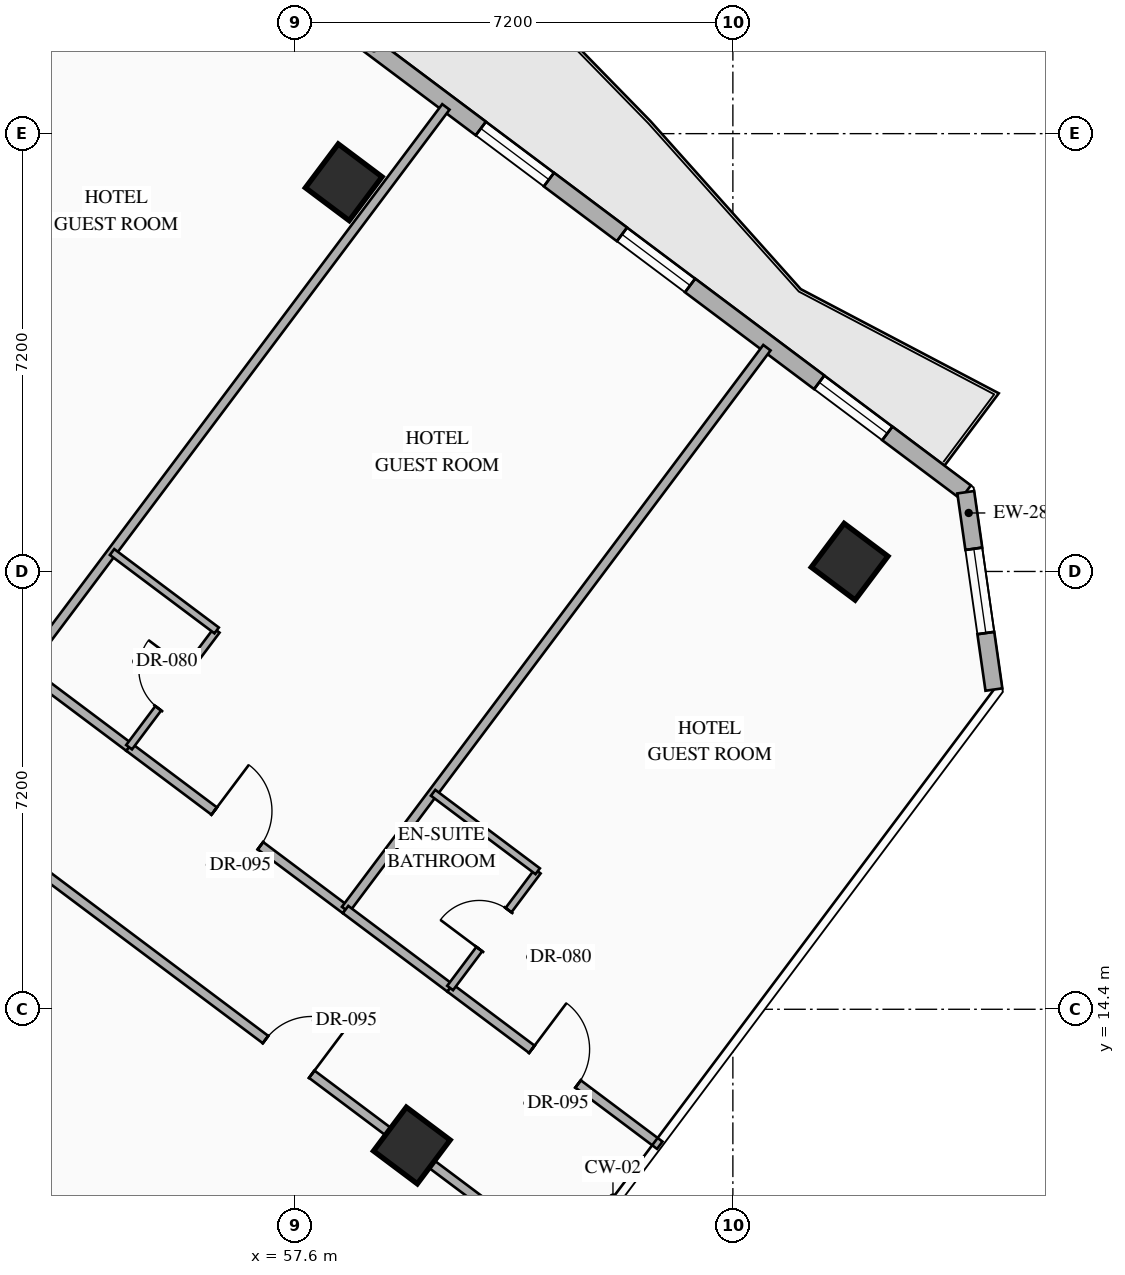
"""IFC4 building model, lengths in metres.
Left out: names, types, materials, properties, quantities, classifications, styles, units other than length and angle.
Written with IfcOpenShell. Run it as: python <this file> out.ifc"""

import sys

from ifc_helpers import new_model, si_unit, direction, frame, frame_2d, origin, origin_2d, place, context, subcontext, project, spatial, rectangle, hollow_rectangle, extrude, element, fill, save


model = new_model("IFC4")
c1 = context("Model", 3, precision=1e-05, world=origin(), true_north=direction((0.0, 1.0)))
c2 = subcontext(c1, "Body", "Model", "MODEL_VIEW")
j1 = project(units=[si_unit("LENGTHUNIT", "METRE"), si_unit("PLANEANGLEUNIT", "RADIAN")], contexts=[c1])
p1 = place(None, origin())
s1 = spatial("IfcSite", under=j1, at=p1, CompositionType="ELEMENT")
p2 = place(p1, origin())
s2 = spatial("IfcBuilding", under=s1, at=p2, CompositionType="ELEMENT")
p3 = place(p2, frame((0.0, 0.0, 84.65)))
s3 = spatial("IfcBuildingStorey", under=s2, at=p3, CompositionType="ELEMENT", Elevation=84.65)
for number, where, z_axis, x_axis in (
    (1, (58.4, 28.0, 0.0), (0.0, 0.0, 1.0), (0.8, -0.6, 0.0)),
    (2, (66.72, 21.76, 0.0), (0.0, 0.0, 1.0), (0.8, -0.6, 0.0)),
    (3, (59.52, 12.16, 0.0), (0.0, 0.0, 1.0), (0.8, -0.6, 0.0)),
):
    element("IfcColumn", number, at=place(p3, frame(where, z_axis=z_axis, x_axis=x_axis)), inside=s3, PredefinedType="COLUMN", context=c2, shape_type="SweptSolid", body=[
        extrude(hollow_rectangle(XDim=0.9, YDim=0.9, WallThickness=0.036, at=origin_2d()), origin(), (0.0, 0.0, 1.0), 3.35),
    ])
p4 = place(p3, frame((44.86, 40.73, 0.0), z_axis=(0.0, 0.0, 1.0), x_axis=(0.800006902154, -0.599990797017, 0.0)))
e4 = element("IfcWall", 4, at=p4, inside=s3, PredefinedType="STANDARD", context=c2, shape_type="SweptSolid", body=[
    extrude(rectangle(XDim=29.712, YDim=0.28, at=frame_2d((14.856, 0.0))), origin(), (0.0, 0.0, 1.0), 3.13),
])
p5 = place(p4, frame((14.249, 0.0, 0.0)))
e5 = element("IfcOpeningElement", 5, at=p5, cuts=e4, PredefinedType="OPENING", context=c2, shape_type="SweptSolid", body=[
    extrude(rectangle(XDim=1.1, YDim=2.2, at=frame_2d((0.55, 1.1))), frame((0.0, 0.15, 0.0), z_axis=(0.0, -1.0, 0.0), x_axis=(1.0, 0.0, 0.0)), (0.0, 0.0, 1.0), 0.3),
])
p6 = place(p4, frame((1.612, 0.0, 0.85)))
e6 = element("IfcOpeningElement", 6, at=p6, cuts=e4, PredefinedType="OPENING", context=c2, shape_type="SweptSolid", body=[
    extrude(rectangle(XDim=1.4, YDim=1.8, at=frame_2d((0.7, 0.9))), frame((0.0, 0.15, 0.0), z_axis=(0.0, -1.0, 0.0), x_axis=(1.0, 0.0, 0.0)), (0.0, 0.0, 1.0), 0.3),
])
p7 = place(p4, frame((5.667, 0.0, 0.85)))
e7 = element("IfcOpeningElement", 7, at=p7, cuts=e4, PredefinedType="OPENING", context=c2, shape_type="SweptSolid", body=[
    extrude(rectangle(XDim=1.4, YDim=1.8, at=frame_2d((0.7, 0.9))), frame((0.0, 0.15, 0.0), z_axis=(0.0, -1.0, 0.0), x_axis=(1.0, 0.0, 0.0)), (0.0, 0.0, 1.0), 0.3),
])
p8 = place(p4, frame((9.912, 0.0, 0.85)))
e8 = element("IfcOpeningElement", 8, at=p8, cuts=e4, PredefinedType="OPENING", context=c2, shape_type="SweptSolid", body=[
    extrude(rectangle(XDim=1.4, YDim=1.8, at=frame_2d((0.7, 0.9))), frame((0.0, 0.15, 0.0), z_axis=(0.0, -1.0, 0.0), x_axis=(1.0, 0.0, 0.0)), (0.0, 0.0, 1.0), 0.3),
])
p9 = place(p4, frame((19.743, 0.0, 0.85)))
e9 = element("IfcOpeningElement", 9, at=p9, cuts=e4, PredefinedType="OPENING", context=c2, shape_type="SweptSolid", body=[
    extrude(rectangle(XDim=1.4, YDim=1.8, at=frame_2d((0.7, 0.9))), frame((0.0, 0.15, 0.0), z_axis=(0.0, -1.0, 0.0), x_axis=(1.0, 0.0, 0.0)), (0.0, 0.0, 1.0), 0.3),
])
p10 = place(p4, frame((22.645, 0.0, 0.85)))
e10 = element("IfcOpeningElement", 10, at=p10, cuts=e4, PredefinedType="OPENING", context=c2, shape_type="SweptSolid", body=[
    extrude(rectangle(XDim=1.4, YDim=1.8, at=frame_2d((0.7, 0.9))), frame((0.0, 0.15, 0.0), z_axis=(0.0, -1.0, 0.0), x_axis=(1.0, 0.0, 0.0)), (0.0, 0.0, 1.0), 0.3),
])
p11 = place(p4, frame((26.7, 0.0, 0.85)))
e11 = element("IfcOpeningElement", 11, at=p11, cuts=e4, PredefinedType="OPENING", context=c2, shape_type="SweptSolid", body=[
    extrude(rectangle(XDim=1.4, YDim=1.8, at=frame_2d((0.7, 0.9))), frame((0.0, 0.15, 0.0), z_axis=(0.0, -1.0, 0.0), x_axis=(1.0, 0.0, 0.0)), (0.0, 0.0, 1.0), 0.3),
])
p12 = place(p3, frame((68.63, 22.903, 0.0), z_axis=(0.0, 0.0, 1.0), x_axis=(0.141285803956, -0.989968848803, 0.0)))
e12 = element("IfcWall", 12, at=p12, inside=s3, PredefinedType="STANDARD", context=c2, shape_type="SweptSolid", body=[
    extrude(rectangle(XDim=3.278, YDim=0.28, at=frame_2d((1.639, 0.0))), origin(), (0.0, 0.0, 1.0), 3.13),
])
p13 = place(p12, frame((0.939, 0.0, 0.85)))
e13 = element("IfcOpeningElement", 13, at=p13, cuts=e12, PredefinedType="OPENING", context=c2, shape_type="SweptSolid", body=[
    extrude(rectangle(XDim=1.4, YDim=1.8, at=frame_2d((0.7, 0.9))), frame((0.0, 0.15, 0.0), z_axis=(0.0, -1.0, 0.0), x_axis=(1.0, 0.0, 0.0)), (0.0, 0.0, 1.0), 0.3),
])
for number, where, z_axis, x_axis in (
    (14, (47.87, 23.96, 0.0), (0.0, 0.0, 1.0), (0.6, 0.8, 0.0)),
    (15, (53.15, 20.0, 0.0), (0.0, 0.0, 1.0), (0.6, 0.8, 0.0)),
):
    element("IfcWall", number, at=place(p3, frame(where, z_axis=z_axis, x_axis=x_axis)), inside=s3, PredefinedType="PARTITIONING", context=c2, shape_type="SweptSolid", body=[
        extrude(rectangle(XDim=11.55, YDim=0.15, at=frame_2d((5.775, 0.0))), origin(), (0.0, 0.0, 1.0), 3.13),
    ])
p14 = place(p3, frame((53.15, 20.0, 0.0), z_axis=(0.0, 0.0, 1.0), x_axis=(0.800027249606, -0.599963665473, 0.0)))
e16 = element("IfcWall", 16, at=p14, inside=s3, PredefinedType="PARTITIONING", context=c2, shape_type="SweptSolid", body=[
    extrude(rectangle(XDim=2.15, YDim=0.15, at=frame_2d((1.075, 0.0))), origin(), (0.0, 0.0, 1.0), 2.775),
])
p15 = place(p3, frame((54.87, 18.71, 0.0), z_axis=(0.0, 0.0, 1.0), x_axis=(0.799993416095, -0.600008778439, 0.0)))
e17 = element("IfcWall", 17, at=p15, inside=s3, PredefinedType="PARTITIONING", context=c2, shape_type="SweptSolid", body=[
    extrude(rectangle(XDim=4.45, YDim=0.15, at=frame_2d((2.225, 0.0))), origin(), (0.0, 0.0, 1.0), 2.775),
])
p16 = place(p15, frame((1.75, 0.0, 0.0)))
e18 = element("IfcOpeningElement", 18, at=p16, cuts=e17, PredefinedType="OPENING", context=c2, shape_type="SweptSolid", body=[
    extrude(rectangle(XDim=0.95, YDim=2.15, at=frame_2d((0.475, 1.075))), frame((0.0, 0.085, 0.0), z_axis=(0.0, -1.0, 0.0), x_axis=(1.0, 0.0, 0.0)), (0.0, 0.0, 1.0), 0.17),
])
p17 = place(p3, frame((54.87, 18.71, 0.0), z_axis=(0.0, 0.0, 1.0), x_axis=(0.6, 0.8, 0.0)))
e19 = element("IfcWall", 19, at=p17, inside=s3, PredefinedType="PARTITIONING", context=c2, shape_type="SweptSolid", body=[
    extrude(rectangle(XDim=2.4, YDim=0.12, at=frame_2d((1.2, 0.0))), origin(), (0.0, 0.0, 1.0), 3.13),
])
p18 = place(p17, frame((0.8, 0.0, 0.0)))
e20 = element("IfcOpeningElement", 20, at=p18, cuts=e19, PredefinedType="OPENING", context=c2, shape_type="SweptSolid", body=[
    extrude(rectangle(XDim=0.8, YDim=2.06, at=frame_2d((0.4, 1.03))), frame((0.0, 0.07, 0.0), z_axis=(0.0, -1.0, 0.0), x_axis=(1.0, 0.0, 0.0)), (0.0, 0.0, 1.0), 0.14),
])
p19 = place(p3, frame((54.59, 21.92, 0.0), z_axis=(0.0, 0.0, 1.0), x_axis=(0.79998637334, -0.60001816845, 0.0)))
e21 = element("IfcWall", 21, at=p19, inside=s3, PredefinedType="PARTITIONING", context=c2, shape_type="SweptSolid", body=[
    extrude(rectangle(XDim=2.15, YDim=0.12, at=frame_2d((1.075, 0.0))), origin(), (0.0, 0.0, 1.0), 3.13),
])
p20 = place(p3, frame((58.43, 16.04, 0.0), z_axis=(0.0, 0.0, 1.0), x_axis=(0.60001014597, 0.799992390422, 0.0)))
e22 = element("IfcWall", 22, at=p20, inside=s3, PredefinedType="PARTITIONING", context=c2, shape_type="SweptSolid", body=[
    extrude(rectangle(XDim=11.55, YDim=0.15, at=frame_2d((5.775, 0.0))), origin(), (0.0, 0.0, 1.0), 3.13),
])
p21 = place(p3, frame((58.43, 16.04, 0.0), z_axis=(0.0, 0.0, 1.0), x_axis=(0.79998637334, -0.60001816845, 0.0)))
e23 = element("IfcWall", 23, at=p21, inside=s3, PredefinedType="PARTITIONING", context=c2, shape_type="SweptSolid", body=[
    extrude(rectangle(XDim=2.15, YDim=0.15, at=frame_2d((1.075, 0.0))), origin(), (0.0, 0.0, 1.0), 2.775),
])
p22 = place(p3, frame((60.15, 14.75, 0.0), z_axis=(0.0, 0.0, 1.0), x_axis=(0.800006797429, -0.599990936654, 0.0)))
e24 = element("IfcWall", 24, at=p22, inside=s3, PredefinedType="PARTITIONING", context=c2, shape_type="SweptSolid", body=[
    extrude(rectangle(XDim=4.31, YDim=0.15, at=frame_2d((2.155, 0.0))), origin(), (0.0, 0.0, 1.0), 2.775),
])
p23 = place(p22, frame((1.68, 0.0, 0.0)))
e25 = element("IfcOpeningElement", 25, at=p23, cuts=e24, PredefinedType="OPENING", context=c2, shape_type="SweptSolid", body=[
    extrude(rectangle(XDim=0.95, YDim=2.15, at=frame_2d((0.475, 1.075))), frame((0.0, 0.085, 0.0), z_axis=(0.0, -1.0, 0.0), x_axis=(1.0, 0.0, 0.0)), (0.0, 0.0, 1.0), 0.17),
])
p24 = place(p3, frame((60.15, 14.75, 0.0), z_axis=(0.0, 0.0, 1.0), x_axis=(0.600065100855, 0.79995117022, 0.0)))
e26 = element("IfcWall", 26, at=p24, inside=s3, PredefinedType="PARTITIONING", context=c2, shape_type="SweptSolid", body=[
    extrude(rectangle(XDim=2.4, YDim=0.12, at=frame_2d((1.2, 0.0))), origin(), (0.0, 0.0, 1.0), 3.13),
])
p25 = place(p24, frame((0.8, 0.0, 0.0)))
e27 = element("IfcOpeningElement", 27, at=p25, cuts=e26, PredefinedType="OPENING", context=c2, shape_type="SweptSolid", body=[
    extrude(rectangle(XDim=0.8, YDim=2.06, at=frame_2d((0.4, 1.03))), frame((0.0, 0.07, 0.0), z_axis=(0.0, -1.0, 0.0), x_axis=(1.0, 0.0, 0.0)), (0.0, 0.0, 1.0), 0.14),
])
p26 = place(p3, frame((59.87, 17.96, 0.0), z_axis=(0.0, 0.0, 1.0), x_axis=(0.79998637334, -0.60001816845, 0.0)))
e28 = element("IfcWall", 28, at=p26, inside=s3, PredefinedType="PARTITIONING", context=c2, shape_type="SweptSolid", body=[
    extrude(rectangle(XDim=2.15, YDim=0.12, at=frame_2d((1.075, 0.0))), origin(), (0.0, 0.0, 1.0), 3.13),
])
p27 = place(p3, frame((52.89, 17.07, 0.0), z_axis=(0.0, 0.0, 1.0), x_axis=(0.8, -0.6, 0.0)))
e29 = element("IfcWall", 29, at=p27, inside=s3, PredefinedType="PARTITIONING", context=c2, shape_type="SweptSolid", body=[
    extrude(rectangle(XDim=11.51, YDim=0.15, at=frame_2d((5.755, 0.0))), origin(), (0.0, 0.0, 1.0), 2.425),
])
p28 = place(p27, frame((5.28, 0.0, 0.0)))
e30 = element("IfcOpeningElement", 30, at=p28, cuts=e29, PredefinedType="OPENING", context=c2, shape_type="SweptSolid", body=[
    extrude(rectangle(XDim=0.95, YDim=2.15, at=frame_2d((0.475, 1.075))), frame((0.0, 0.085, 0.0), z_axis=(0.0, -1.0, 0.0), x_axis=(1.0, 0.0, 0.0)), (0.0, 0.0, 1.0), 0.17),
])
p29 = place(p9, origin())
e31 = element("IfcWindow", 31, at=p29, inside=s3, PartitioningType="SINGLE_PANEL", PredefinedType="WINDOW", context=c2, shape_type="SweptSolid", body=[
    extrude(rectangle(XDim=1.4, YDim=1.8, at=frame_2d((0.7, 0.9))), frame((0.0, 0.03, 0.0), z_axis=(0.0, -1.0, 0.0), x_axis=(1.0, 0.0, 0.0)), (0.0, 0.0, 1.0), 0.06),
])
fill(e9, e31)
p30 = place(p10, origin())
e32 = element("IfcWindow", 32, at=p30, inside=s3, PartitioningType="SINGLE_PANEL", PredefinedType="WINDOW", context=c2, shape_type="SweptSolid", body=[
    extrude(rectangle(XDim=1.4, YDim=1.8, at=frame_2d((0.7, 0.9))), frame((0.0, 0.03, 0.0), z_axis=(0.0, -1.0, 0.0), x_axis=(1.0, 0.0, 0.0)), (0.0, 0.0, 1.0), 0.06),
])
fill(e10, e32)
p31 = place(p11, origin())
e33 = element("IfcWindow", 33, at=p31, inside=s3, PartitioningType="SINGLE_PANEL", PredefinedType="WINDOW", context=c2, shape_type="SweptSolid", body=[
    extrude(rectangle(XDim=1.4, YDim=1.8, at=frame_2d((0.7, 0.9))), frame((0.0, 0.03, 0.0), z_axis=(0.0, -1.0, 0.0), x_axis=(1.0, 0.0, 0.0)), (0.0, 0.0, 1.0), 0.06),
])
fill(e11, e33)
p32 = place(p13, origin())
e34 = element("IfcWindow", 34, at=p32, inside=s3, PartitioningType="SINGLE_PANEL", PredefinedType="WINDOW", context=c2, shape_type="SweptSolid", body=[
    extrude(rectangle(XDim=1.4, YDim=1.8, at=frame_2d((0.7, 0.9))), frame((0.0, 0.03, 0.0), z_axis=(0.0, -1.0, 0.0), x_axis=(1.0, 0.0, 0.0)), (0.0, 0.0, 1.0), 0.06),
])
fill(e13, e34)
p33 = place(p16, origin())
e35 = element("IfcDoor", 35, at=p33, inside=s3, OperationType="SINGLE_SWING_LEFT", PredefinedType="DOOR", context=c2, shape_type="SweptSolid", body=[
    extrude(rectangle(XDim=0.95, YDim=2.15, at=frame_2d((0.475, 1.075))), frame((0.0, 0.025, 0.0), z_axis=(0.0, -1.0, 0.0), x_axis=(1.0, 0.0, 0.0)), (0.0, 0.0, 1.0), 0.05),
])
fill(e18, e35)
p34 = place(p18, origin())
e36 = element("IfcDoor", 36, at=p34, inside=s3, OperationType="SINGLE_SWING_RIGHT", PredefinedType="DOOR", context=c2, shape_type="SweptSolid", body=[
    extrude(rectangle(XDim=0.8, YDim=2.06, at=frame_2d((0.4, 1.03))), frame((0.0, 0.025, 0.0), z_axis=(0.0, -1.0, 0.0), x_axis=(1.0, 0.0, 0.0)), (0.0, 0.0, 1.0), 0.05),
])
fill(e20, e36)
p35 = place(p23, origin())
e37 = element("IfcDoor", 37, at=p35, inside=s3, OperationType="SINGLE_SWING_LEFT", PredefinedType="DOOR", context=c2, shape_type="SweptSolid", body=[
    extrude(rectangle(XDim=0.95, YDim=2.15, at=frame_2d((0.475, 1.075))), frame((0.0, 0.025, 0.0), z_axis=(0.0, -1.0, 0.0), x_axis=(1.0, 0.0, 0.0)), (0.0, 0.0, 1.0), 0.05),
])
fill(e25, e37)
p36 = place(p25, origin())
e38 = element("IfcDoor", 38, at=p36, inside=s3, OperationType="SINGLE_SWING_LEFT", PredefinedType="DOOR", context=c2, shape_type="SweptSolid", body=[
    extrude(rectangle(XDim=0.8, YDim=2.06, at=frame_2d((0.4, 1.03))), frame((0.0, 0.025, 0.0), z_axis=(0.0, -1.0, 0.0), x_axis=(1.0, 0.0, 0.0)), (0.0, 0.0, 1.0), 0.05),
])
fill(e27, e38)
p37 = place(p28, origin())
e39 = element("IfcDoor", 39, at=p37, inside=s3, OperationType="SINGLE_SWING_RIGHT", PredefinedType="DOOR", context=c2, shape_type="SweptSolid", body=[
    extrude(rectangle(XDim=0.95, YDim=2.15, at=frame_2d((0.475, 1.075))), frame((0.0, 0.025, 0.0), z_axis=(0.0, -1.0, 0.0), x_axis=(1.0, 0.0, 0.0)), (0.0, 0.0, 1.0), 0.05),
])
fill(e30, e39)
save(model, sys.argv[1])
